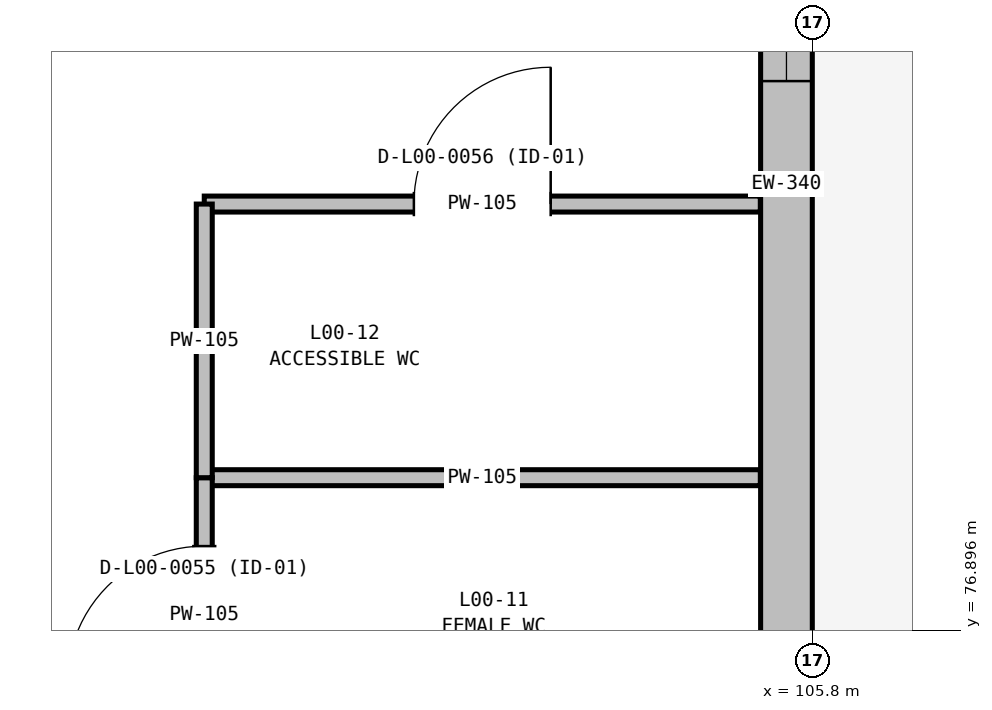
"""IFC4 building model, lengths in metres.
Left out: names, types, materials, properties, quantities, classifications, styles, units other than length and angle.
Written with IfcOpenShell. Run it as: python <this file> out.ifc"""

import sys

from ifc_helpers import new_model, si_unit, direction, frame, frame_2d, origin, place, context, subcontext, project, spatial, rectangle, extrude, element, fill, save


model = new_model("IFC4")
c1 = context("Model", 3, precision=1e-05, world=origin(), true_north=direction((0.0, 1.0)))
c2 = subcontext(c1, "Body", "Model", "MODEL_VIEW")
j1 = project(units=[si_unit("LENGTHUNIT", "METRE"), si_unit("PLANEANGLEUNIT", "RADIAN")], contexts=[c1])
p1 = place(None, origin())
s1 = spatial("IfcSite", under=j1, at=p1, CompositionType="ELEMENT")
p2 = place(p1, origin())
s2 = spatial("IfcBuilding", under=s1, at=p2, CompositionType="ELEMENT")
p3 = place(p2, origin())
s3 = spatial("IfcBuildingStorey", under=s2, at=p3, CompositionType="ELEMENT", Elevation=0.0)
p4 = place(p3, frame((105.63, 83.86, 0.0), z_axis=(0.0, 0.0, 1.0), x_axis=(0.0, -1.0, 0.0)))
e1 = element("IfcWall", 1, at=p4, inside=s3, PredefinedType="STANDARD", context=c2, shape_type="SweptSolid", body=[
    extrude(rectangle(XDim=8.06, YDim=0.34, at=frame_2d((4.03, 0.0))), origin(), (0.0, 0.0, 1.0), 4.535),
])
p5 = place(p4, frame((1.001, 0.0, 0.9)))
e2 = element("IfcOpeningElement", 2, at=p5, cuts=e1, PredefinedType="OPENING", context=c2, shape_type="SweptSolid", body=[
    extrude(rectangle(XDim=2.35, YDim=1.5, at=frame_2d((1.175, 0.75))), frame((0.0, 0.18, 0.0), z_axis=(0.0, -1.0, 0.0), x_axis=(1.0, 0.0, 0.0)), (0.0, 0.0, 1.0), 0.36),
])
p6 = place(p3, frame((101.8, 77.9, 0.0), z_axis=(0.0, 0.0, 1.0), x_axis=(1.0, 0.0, 0.0)))
e3 = element("IfcWall", 3, at=p6, inside=s3, PredefinedType="PARTITIONING", context=c2, shape_type="SweptSolid", body=[
    extrude(rectangle(XDim=3.658, YDim=0.105, at=frame_2d((1.829, 0.0))), origin(), (0.0, 0.0, 1.0), 4.535),
])
p7 = place(p3, frame((101.8, 76.1, 0.0), z_axis=(0.0, 0.0, 1.0), x_axis=(0.0, 1.0, 0.0)))
e4 = element("IfcWall", 4, at=p7, inside=s3, PredefinedType="PARTITIONING", context=c2, shape_type="SweptSolid", body=[
    extrude(rectangle(XDim=1.8, YDim=0.105, at=frame_2d((0.9, 0.0))), origin(), (0.0, 0.0, 1.0), 4.735),
])
p8 = place(p7, frame((0.45, 0.0, 0.0)))
e5 = element("IfcOpeningElement", 5, at=p8, cuts=e4, PredefinedType="OPENING", context=c2, shape_type="SweptSolid", body=[
    extrude(rectangle(XDim=0.9, YDim=2.02, at=frame_2d((0.45, 1.01))), frame((0.0, 0.062, 0.0), z_axis=(0.0, -1.0, 0.0), x_axis=(1.0, 0.0, 0.0)), (0.0, 0.0, 1.0), 0.125),
])
p9 = place(p3, frame((101.8, 79.7, 0.0), z_axis=(0.0, 0.0, 1.0), x_axis=(1.0, 0.0, 0.0)))
e6 = element("IfcWall", 6, at=p9, inside=s3, PredefinedType="PARTITIONING", context=c2, shape_type="SweptSolid", body=[
    extrude(rectangle(XDim=3.658, YDim=0.105, at=frame_2d((1.829, 0.0))), origin(), (0.0, 0.0, 1.0), 4.535),
])
p10 = place(p9, frame((1.379, 0.0, 0.0)))
e7 = element("IfcOpeningElement", 7, at=p10, cuts=e6, PredefinedType="OPENING", context=c2, shape_type="SweptSolid", body=[
    extrude(rectangle(XDim=0.9, YDim=2.02, at=frame_2d((0.45, 1.01))), frame((0.0, 0.062, 0.0), z_axis=(0.0, -1.0, 0.0), x_axis=(1.0, 0.0, 0.0)), (0.0, 0.0, 1.0), 0.125),
])
p11 = place(p3, frame((101.8, 77.9, 0.0), z_axis=(0.0, 0.0, 1.0), x_axis=(0.0, 1.0, 0.0)))
e8 = element("IfcWall", 8, at=p11, inside=s3, PredefinedType="PARTITIONING", context=c2, shape_type="SweptSolid", body=[
    extrude(rectangle(XDim=1.8, YDim=0.105, at=frame_2d((0.9, 0.0))), origin(), (0.0, 0.0, 1.0), 5.095),
])
p12 = place(p5, origin())
e9 = element("IfcWindow", 9, at=p12, inside=s3, PartitioningType="SINGLE_PANEL", PredefinedType="WINDOW", context=c2, shape_type="SweptSolid", body=[
    extrude(rectangle(XDim=2.35, YDim=1.5, at=frame_2d((1.175, 0.75))), frame((0.0, 0.03, 0.0), z_axis=(0.0, -1.0, 0.0), x_axis=(1.0, 0.0, 0.0)), (0.0, 0.0, 1.0), 0.06),
])
fill(e2, e9)
p13 = place(p8, origin())
e10 = element("IfcDoor", 10, at=p13, inside=s3, OperationType="SINGLE_SWING_LEFT", PredefinedType="DOOR", context=c2, shape_type="SweptSolid", body=[
    extrude(rectangle(XDim=0.9, YDim=2.02, at=frame_2d((0.45, 1.01))), frame((0.0, 0.025, 0.0), z_axis=(0.0, -1.0, 0.0), x_axis=(1.0, 0.0, 0.0)), (0.0, 0.0, 1.0), 0.05),
])
fill(e5, e10)
p14 = place(p10, origin())
e11 = element("IfcDoor", 11, at=p14, inside=s3, OperationType="SINGLE_SWING_RIGHT", PredefinedType="DOOR", context=c2, shape_type="SweptSolid", body=[
    extrude(rectangle(XDim=0.9, YDim=2.02, at=frame_2d((0.45, 1.01))), frame((0.0, 0.025, 0.0), z_axis=(0.0, -1.0, 0.0), x_axis=(1.0, 0.0, 0.0)), (0.0, 0.0, 1.0), 0.05),
])
fill(e7, e11)
save(model, sys.argv[1])
